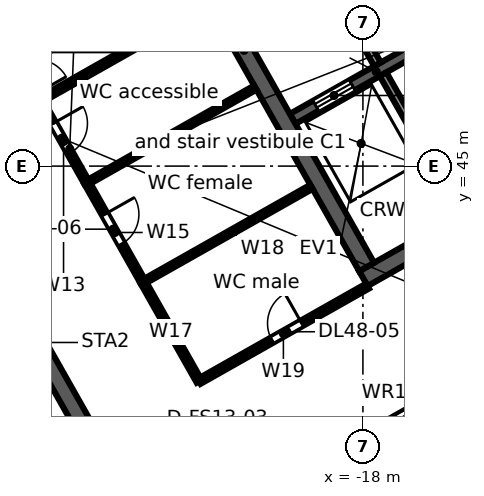
"""IFC4 building model, lengths in metres.
Left out: names, types, materials, properties, quantities, classifications, styles, units other than length and angle.
Written with IfcOpenShell. Run it as: python <this file> out.ifc"""

import sys

from ifc_helpers import new_model, si_unit, direction, frame, frame_2d, origin, place, context, subcontext, project, spatial, rectangle, extrude, element, fill, save


model = new_model("IFC4")
c1 = context("Model", 3, precision=1e-05, world=origin(), true_north=direction((0.0, 1.0)))
c2 = subcontext(c1, "Body", "Model", "MODEL_VIEW")
j1 = project(units=[si_unit("LENGTHUNIT", "METRE"), si_unit("PLANEANGLEUNIT", "RADIAN")], contexts=[c1])
p1 = place(None, origin())
s1 = spatial("IfcSite", under=j1, at=p1, CompositionType="ELEMENT")
p2 = place(p1, origin())
s2 = spatial("IfcBuilding", under=s1, at=p2, CompositionType="ELEMENT")
p3 = place(p2, frame((0.0, 0.0, 223.1)))
s3 = spatial("IfcBuildingStorey", under=s2, at=p3, CompositionType="ELEMENT", Elevation=223.1)
p4 = place(p3, frame((-0.046, 47.974, 0.0), z_axis=(0.0, 0.0, 1.0), x_axis=(-0.870356579543, -0.492421998337, 0.0)))
e1 = element("IfcWall", 1, at=p4, inside=s3, PredefinedType="STANDARD", context=c2, shape_type="SweptSolid", body=[
    extrude(rectangle(XDim=43.754, YDim=0.25, at=frame_2d((21.877, 0.0))), origin(), (0.0, 0.0, 1.0), 3.62),
])
p5 = place(p4, frame((41.061, 0.0, 0.8)))
e2 = element("IfcOpeningElement", 2, at=p5, cuts=e1, PredefinedType="OPENING", context=c2, shape_type="SweptSolid", body=[
    extrude(rectangle(XDim=2.4, YDim=2.2, at=frame_2d((1.2, 1.1))), frame((0.0, 0.135, 0.0), z_axis=(0.0, -1.0, 0.0), x_axis=(1.0, 0.0, 0.0)), (0.0, 0.0, 1.0), 0.27),
])
p6 = place(p4, frame((38.443, 0.0, 0.0)))
e3 = element("IfcOpeningElement", 3, at=p6, cuts=e1, PredefinedType="OPENING", context=c2, shape_type="SweptSolid", body=[
    extrude(rectangle(XDim=1.8, YDim=2.4, at=frame_2d((0.9, 1.2))), frame((0.0, 0.135, 0.0), z_axis=(0.0, -1.0, 0.0), x_axis=(1.0, 0.0, 0.0)), (0.0, 0.0, 1.0), 0.27),
])
p7 = place(p4, frame((35.225, 0.0, 0.8)))
e4 = element("IfcOpeningElement", 4, at=p7, cuts=e1, PredefinedType="OPENING", context=c2, shape_type="SweptSolid", body=[
    extrude(rectangle(XDim=2.4, YDim=2.2, at=frame_2d((1.2, 1.1))), frame((0.0, 0.135, 0.0), z_axis=(0.0, -1.0, 0.0), x_axis=(1.0, 0.0, 0.0)), (0.0, 0.0, 1.0), 0.27),
])
p8 = place(p4, frame((32.307, 0.0, 0.8)))
e5 = element("IfcOpeningElement", 5, at=p8, cuts=e1, PredefinedType="OPENING", context=c2, shape_type="SweptSolid", body=[
    extrude(rectangle(XDim=2.4, YDim=2.2, at=frame_2d((1.2, 1.1))), frame((0.0, 0.135, 0.0), z_axis=(0.0, -1.0, 0.0), x_axis=(1.0, 0.0, 0.0)), (0.0, 0.0, 1.0), 0.27),
])
p9 = place(p4, frame((29.688, 0.0, 0.0)))
e6 = element("IfcOpeningElement", 6, at=p9, cuts=e1, PredefinedType="OPENING", context=c2, shape_type="SweptSolid", body=[
    extrude(rectangle(XDim=1.8, YDim=2.4, at=frame_2d((0.9, 1.2))), frame((0.0, 0.135, 0.0), z_axis=(0.0, -1.0, 0.0), x_axis=(1.0, 0.0, 0.0)), (0.0, 0.0, 1.0), 0.27),
])
p10 = place(p4, frame((26.47, 0.0, 0.8)))
e7 = element("IfcOpeningElement", 7, at=p10, cuts=e1, PredefinedType="OPENING", context=c2, shape_type="SweptSolid", body=[
    extrude(rectangle(XDim=2.4, YDim=2.2, at=frame_2d((1.2, 1.1))), frame((0.0, 0.135, 0.0), z_axis=(0.0, -1.0, 0.0), x_axis=(1.0, 0.0, 0.0)), (0.0, 0.0, 1.0), 0.27),
])
p11 = place(p4, frame((23.552, 0.0, 0.8)))
e8 = element("IfcOpeningElement", 8, at=p11, cuts=e1, PredefinedType="OPENING", context=c2, shape_type="SweptSolid", body=[
    extrude(rectangle(XDim=2.4, YDim=2.2, at=frame_2d((1.2, 1.1))), frame((0.0, 0.135, 0.0), z_axis=(0.0, -1.0, 0.0), x_axis=(1.0, 0.0, 0.0)), (0.0, 0.0, 1.0), 0.27),
])
p12 = place(p4, frame((20.934, 0.0, 0.0)))
e9 = element("IfcOpeningElement", 9, at=p12, cuts=e1, PredefinedType="OPENING", context=c2, shape_type="SweptSolid", body=[
    extrude(rectangle(XDim=1.8, YDim=2.4, at=frame_2d((0.9, 1.2))), frame((0.0, 0.135, 0.0), z_axis=(0.0, -1.0, 0.0), x_axis=(1.0, 0.0, 0.0)), (0.0, 0.0, 1.0), 0.27),
])
p13 = place(p4, frame((17.716, 0.0, 0.8)))
e10 = element("IfcOpeningElement", 10, at=p13, cuts=e1, PredefinedType="OPENING", context=c2, shape_type="SweptSolid", body=[
    extrude(rectangle(XDim=2.4, YDim=2.2, at=frame_2d((1.2, 1.1))), frame((0.0, 0.135, 0.0), z_axis=(0.0, -1.0, 0.0), x_axis=(1.0, 0.0, 0.0)), (0.0, 0.0, 1.0), 0.27),
])
p14 = place(p4, frame((14.798, 0.0, 0.8)))
e11 = element("IfcOpeningElement", 11, at=p14, cuts=e1, PredefinedType="OPENING", context=c2, shape_type="SweptSolid", body=[
    extrude(rectangle(XDim=2.4, YDim=2.2, at=frame_2d((1.2, 1.1))), frame((0.0, 0.135, 0.0), z_axis=(0.0, -1.0, 0.0), x_axis=(1.0, 0.0, 0.0)), (0.0, 0.0, 1.0), 0.27),
])
p15 = place(p4, frame((12.179, 0.0, 0.0)))
e12 = element("IfcOpeningElement", 12, at=p15, cuts=e1, PredefinedType="OPENING", context=c2, shape_type="SweptSolid", body=[
    extrude(rectangle(XDim=1.8, YDim=2.4, at=frame_2d((0.9, 1.2))), frame((0.0, 0.135, 0.0), z_axis=(0.0, -1.0, 0.0), x_axis=(1.0, 0.0, 0.0)), (0.0, 0.0, 1.0), 0.27),
])
p16 = place(p4, frame((8.961, 0.0, 0.8)))
e13 = element("IfcOpeningElement", 13, at=p16, cuts=e1, PredefinedType="OPENING", context=c2, shape_type="SweptSolid", body=[
    extrude(rectangle(XDim=2.4, YDim=2.2, at=frame_2d((1.2, 1.1))), frame((0.0, 0.135, 0.0), z_axis=(0.0, -1.0, 0.0), x_axis=(1.0, 0.0, 0.0)), (0.0, 0.0, 1.0), 0.27),
])
p17 = place(p4, frame((6.043, 0.0, 0.8)))
e14 = element("IfcOpeningElement", 14, at=p17, cuts=e1, PredefinedType="OPENING", context=c2, shape_type="SweptSolid", body=[
    extrude(rectangle(XDim=2.4, YDim=2.2, at=frame_2d((1.2, 1.1))), frame((0.0, 0.135, 0.0), z_axis=(0.0, -1.0, 0.0), x_axis=(1.0, 0.0, 0.0)), (0.0, 0.0, 1.0), 0.27),
])
p18 = place(p4, frame((3.425, 0.0, 0.0)))
e15 = element("IfcOpeningElement", 15, at=p18, cuts=e1, PredefinedType="OPENING", context=c2, shape_type="SweptSolid", body=[
    extrude(rectangle(XDim=1.8, YDim=2.4, at=frame_2d((0.9, 1.2))), frame((0.0, 0.135, 0.0), z_axis=(0.0, -1.0, 0.0), x_axis=(1.0, 0.0, 0.0)), (0.0, 0.0, 1.0), 0.27),
])
p19 = place(p4, frame((0.207, 0.0, 0.8)))
e16 = element("IfcOpeningElement", 16, at=p19, cuts=e1, PredefinedType="OPENING", context=c2, shape_type="SweptSolid", body=[
    extrude(rectangle(XDim=2.4, YDim=2.2, at=frame_2d((1.2, 1.1))), frame((0.0, 0.135, 0.0), z_axis=(0.0, -1.0, 0.0), x_axis=(1.0, 0.0, 0.0)), (0.0, 0.0, 1.0), 0.27),
])
p20 = place(p3, frame((-58.732, 38.771, 0.0), z_axis=(0.0, 0.0, 1.0), x_axis=(0.870354824205, 0.492425100887, 0.0)))
e17 = element("IfcWall", 17, at=p20, inside=s3, PredefinedType="STANDARD", context=c2, shape_type="SweptSolid", body=[
    extrude(rectangle(XDim=64.006, YDim=0.25, at=frame_2d((32.003, 0.0))), origin(), (0.0, 0.0, 1.0), 3.62),
])
p21 = place(p20, frame((61.259, 0.0, 0.8)))
e18 = element("IfcOpeningElement", 18, at=p21, cuts=e17, PredefinedType="OPENING", context=c2, shape_type="SweptSolid", body=[
    extrude(rectangle(XDim=2.4, YDim=2.2, at=frame_2d((1.2, 1.1))), frame((0.0, 0.135, 0.0), z_axis=(0.0, -1.0, 0.0), x_axis=(1.0, 0.0, 0.0)), (0.0, 0.0, 1.0), 0.27),
])
p22 = place(p20, frame((58.216, 0.0, 0.8)))
e19 = element("IfcOpeningElement", 19, at=p22, cuts=e17, PredefinedType="OPENING", context=c2, shape_type="SweptSolid", body=[
    extrude(rectangle(XDim=2.4, YDim=2.2, at=frame_2d((1.2, 1.1))), frame((0.0, 0.135, 0.0), z_axis=(0.0, -1.0, 0.0), x_axis=(1.0, 0.0, 0.0)), (0.0, 0.0, 1.0), 0.27),
])
p23 = place(p20, frame((55.173, 0.0, 0.8)))
e20 = element("IfcOpeningElement", 20, at=p23, cuts=e17, PredefinedType="OPENING", context=c2, shape_type="SweptSolid", body=[
    extrude(rectangle(XDim=2.4, YDim=2.2, at=frame_2d((1.2, 1.1))), frame((0.0, 0.135, 0.0), z_axis=(0.0, -1.0, 0.0), x_axis=(1.0, 0.0, 0.0)), (0.0, 0.0, 1.0), 0.27),
])
p24 = place(p20, frame((52.129, 0.0, 0.8)))
e21 = element("IfcOpeningElement", 21, at=p24, cuts=e17, PredefinedType="OPENING", context=c2, shape_type="SweptSolid", body=[
    extrude(rectangle(XDim=2.4, YDim=2.2, at=frame_2d((1.2, 1.1))), frame((0.0, 0.135, 0.0), z_axis=(0.0, -1.0, 0.0), x_axis=(1.0, 0.0, 0.0)), (0.0, 0.0, 1.0), 0.27),
])
p25 = place(p20, frame((49.086, 0.0, 0.8)))
e22 = element("IfcOpeningElement", 22, at=p25, cuts=e17, PredefinedType="OPENING", context=c2, shape_type="SweptSolid", body=[
    extrude(rectangle(XDim=2.4, YDim=2.2, at=frame_2d((1.2, 1.1))), frame((0.0, 0.135, 0.0), z_axis=(0.0, -1.0, 0.0), x_axis=(1.0, 0.0, 0.0)), (0.0, 0.0, 1.0), 0.27),
])
p26 = place(p20, frame((46.043, 0.0, 0.8)))
e23 = element("IfcOpeningElement", 23, at=p26, cuts=e17, PredefinedType="OPENING", context=c2, shape_type="SweptSolid", body=[
    extrude(rectangle(XDim=2.4, YDim=2.2, at=frame_2d((1.2, 1.1))), frame((0.0, 0.135, 0.0), z_axis=(0.0, -1.0, 0.0), x_axis=(1.0, 0.0, 0.0)), (0.0, 0.0, 1.0), 0.27),
])
p27 = place(p20, frame((43.0, 0.0, 0.8)))
e24 = element("IfcOpeningElement", 24, at=p27, cuts=e17, PredefinedType="OPENING", context=c2, shape_type="SweptSolid", body=[
    extrude(rectangle(XDim=2.4, YDim=2.2, at=frame_2d((1.2, 1.1))), frame((0.0, 0.135, 0.0), z_axis=(0.0, -1.0, 0.0), x_axis=(1.0, 0.0, 0.0)), (0.0, 0.0, 1.0), 0.27),
])
p28 = place(p20, frame((39.956, 0.0, 0.8)))
e25 = element("IfcOpeningElement", 25, at=p28, cuts=e17, PredefinedType="OPENING", context=c2, shape_type="SweptSolid", body=[
    extrude(rectangle(XDim=2.4, YDim=2.2, at=frame_2d((1.2, 1.1))), frame((0.0, 0.135, 0.0), z_axis=(0.0, -1.0, 0.0), x_axis=(1.0, 0.0, 0.0)), (0.0, 0.0, 1.0), 0.27),
])
p29 = place(p20, frame((36.913, 0.0, 0.8)))
e26 = element("IfcOpeningElement", 26, at=p29, cuts=e17, PredefinedType="OPENING", context=c2, shape_type="SweptSolid", body=[
    extrude(rectangle(XDim=2.4, YDim=2.2, at=frame_2d((1.2, 1.1))), frame((0.0, 0.135, 0.0), z_axis=(0.0, -1.0, 0.0), x_axis=(1.0, 0.0, 0.0)), (0.0, 0.0, 1.0), 0.27),
])
p30 = place(p20, frame((33.87, 0.0, 0.8)))
e27 = element("IfcOpeningElement", 27, at=p30, cuts=e17, PredefinedType="OPENING", context=c2, shape_type="SweptSolid", body=[
    extrude(rectangle(XDim=2.4, YDim=2.2, at=frame_2d((1.2, 1.1))), frame((0.0, 0.135, 0.0), z_axis=(0.0, -1.0, 0.0), x_axis=(1.0, 0.0, 0.0)), (0.0, 0.0, 1.0), 0.27),
])
p31 = place(p20, frame((30.826, 0.0, 0.8)))
e28 = element("IfcOpeningElement", 28, at=p31, cuts=e17, PredefinedType="OPENING", context=c2, shape_type="SweptSolid", body=[
    extrude(rectangle(XDim=2.4, YDim=2.2, at=frame_2d((1.2, 1.1))), frame((0.0, 0.135, 0.0), z_axis=(0.0, -1.0, 0.0), x_axis=(1.0, 0.0, 0.0)), (0.0, 0.0, 1.0), 0.27),
])
p32 = place(p20, frame((27.783, 0.0, 0.8)))
e29 = element("IfcOpeningElement", 29, at=p32, cuts=e17, PredefinedType="OPENING", context=c2, shape_type="SweptSolid", body=[
    extrude(rectangle(XDim=2.4, YDim=2.2, at=frame_2d((1.2, 1.1))), frame((0.0, 0.135, 0.0), z_axis=(0.0, -1.0, 0.0), x_axis=(1.0, 0.0, 0.0)), (0.0, 0.0, 1.0), 0.27),
])
p33 = place(p20, frame((24.74, 0.0, 0.8)))
e30 = element("IfcOpeningElement", 30, at=p33, cuts=e17, PredefinedType="OPENING", context=c2, shape_type="SweptSolid", body=[
    extrude(rectangle(XDim=2.4, YDim=2.2, at=frame_2d((1.2, 1.1))), frame((0.0, 0.135, 0.0), z_axis=(0.0, -1.0, 0.0), x_axis=(1.0, 0.0, 0.0)), (0.0, 0.0, 1.0), 0.27),
])
p34 = place(p20, frame((21.696, 0.0, 0.8)))
e31 = element("IfcOpeningElement", 31, at=p34, cuts=e17, PredefinedType="OPENING", context=c2, shape_type="SweptSolid", body=[
    extrude(rectangle(XDim=2.4, YDim=2.2, at=frame_2d((1.2, 1.1))), frame((0.0, 0.135, 0.0), z_axis=(0.0, -1.0, 0.0), x_axis=(1.0, 0.0, 0.0)), (0.0, 0.0, 1.0), 0.27),
])
p35 = place(p20, frame((18.653, 0.0, 0.8)))
e32 = element("IfcOpeningElement", 32, at=p35, cuts=e17, PredefinedType="OPENING", context=c2, shape_type="SweptSolid", body=[
    extrude(rectangle(XDim=2.4, YDim=2.2, at=frame_2d((1.2, 1.1))), frame((0.0, 0.135, 0.0), z_axis=(0.0, -1.0, 0.0), x_axis=(1.0, 0.0, 0.0)), (0.0, 0.0, 1.0), 0.27),
])
p36 = place(p20, frame((15.61, 0.0, 0.8)))
e33 = element("IfcOpeningElement", 33, at=p36, cuts=e17, PredefinedType="OPENING", context=c2, shape_type="SweptSolid", body=[
    extrude(rectangle(XDim=2.4, YDim=2.2, at=frame_2d((1.2, 1.1))), frame((0.0, 0.135, 0.0), z_axis=(0.0, -1.0, 0.0), x_axis=(1.0, 0.0, 0.0)), (0.0, 0.0, 1.0), 0.27),
])
p37 = place(p20, frame((12.567, 0.0, 0.8)))
e34 = element("IfcOpeningElement", 34, at=p37, cuts=e17, PredefinedType="OPENING", context=c2, shape_type="SweptSolid", body=[
    extrude(rectangle(XDim=2.4, YDim=2.2, at=frame_2d((1.2, 1.1))), frame((0.0, 0.135, 0.0), z_axis=(0.0, -1.0, 0.0), x_axis=(1.0, 0.0, 0.0)), (0.0, 0.0, 1.0), 0.27),
])
p38 = place(p20, frame((9.523, 0.0, 0.8)))
e35 = element("IfcOpeningElement", 35, at=p38, cuts=e17, PredefinedType="OPENING", context=c2, shape_type="SweptSolid", body=[
    extrude(rectangle(XDim=2.4, YDim=2.2, at=frame_2d((1.2, 1.1))), frame((0.0, 0.135, 0.0), z_axis=(0.0, -1.0, 0.0), x_axis=(1.0, 0.0, 0.0)), (0.0, 0.0, 1.0), 0.27),
])
p39 = place(p20, frame((6.48, 0.0, 0.8)))
e36 = element("IfcOpeningElement", 36, at=p39, cuts=e17, PredefinedType="OPENING", context=c2, shape_type="SweptSolid", body=[
    extrude(rectangle(XDim=2.4, YDim=2.2, at=frame_2d((1.2, 1.1))), frame((0.0, 0.135, 0.0), z_axis=(0.0, -1.0, 0.0), x_axis=(1.0, 0.0, 0.0)), (0.0, 0.0, 1.0), 0.27),
])
p40 = place(p20, frame((3.437, 0.0, 0.8)))
e37 = element("IfcOpeningElement", 37, at=p40, cuts=e17, PredefinedType="OPENING", context=c2, shape_type="SweptSolid", body=[
    extrude(rectangle(XDim=2.4, YDim=2.2, at=frame_2d((1.2, 1.1))), frame((0.0, 0.135, 0.0), z_axis=(0.0, -1.0, 0.0), x_axis=(1.0, 0.0, 0.0)), (0.0, 0.0, 1.0), 0.27),
])
p41 = place(p20, frame((0.393, 0.0, 0.8)))
e38 = element("IfcOpeningElement", 38, at=p41, cuts=e17, PredefinedType="OPENING", context=c2, shape_type="SweptSolid", body=[
    extrude(rectangle(XDim=2.4, YDim=2.2, at=frame_2d((1.2, 1.1))), frame((0.0, 0.135, 0.0), z_axis=(0.0, -1.0, 0.0), x_axis=(1.0, 0.0, 0.0)), (0.0, 0.0, 1.0), 0.27),
])
p42 = place(p3, frame((-31.787, 49.542, 0.0), z_axis=(0.0, 0.0, 1.0), x_axis=(0.492421378713, -0.870356930107, 0.0)))
e39 = element("IfcWall", 39, at=p42, inside=s3, PredefinedType="SOLIDWALL", context=c2, shape_type="SweptSolid", body=[
    extrude(rectangle(XDim=13.1, YDim=0.45, at=frame_2d((6.55, 0.0))), origin(), (0.0, 0.0, 1.0), 3.62),
])
p43 = place(p3, frame((-17.988, 42.039, 0.0), z_axis=(0.0, 0.0, 1.0), x_axis=(0.870360574057, 0.492414937962, 0.0)))
e40 = element("IfcWall", 40, at=p43, inside=s3, PredefinedType="SOLIDWALL", context=c2, shape_type="SweptSolid", body=[
    extrude(rectangle(XDim=15.0, YDim=0.45, at=frame_2d((7.5, 0.0))), origin(), (0.0, 0.0, 1.0), 3.62),
])
p44 = place(p43, frame((6.1, 0.0, 0.0)))
e41 = element("IfcOpeningElement", 41, at=p44, cuts=e40, PredefinedType="OPENING", context=c2, shape_type="SweptSolid", body=[
    extrude(rectangle(XDim=1.2, YDim=2.1, at=frame_2d((0.6, 1.05))), frame((0.0, 0.235, 0.0), z_axis=(0.0, -1.0, 0.0), x_axis=(1.0, 0.0, 0.0)), (0.0, 0.0, 1.0), 0.47),
])
p45 = place(p3, frame((-19.849, 46.242, 0.0), z_axis=(0.0, 0.0, 1.0), x_axis=(0.870347559728, 0.492437940532, 0.0)))
e42 = element("IfcWall", 42, at=p45, inside=s3, PredefinedType="SOLIDWALL", context=c2, shape_type="SweptSolid", body=[
    extrude(rectangle(XDim=5.05, YDim=0.3, at=frame_2d((2.525, 0.0))), origin(), (0.0, 0.0, 1.0), 3.62),
])
p46 = place(p45, frame((0.7, 0.0, 0.0)))
e43 = element("IfcOpeningElement", 43, at=p46, cuts=e42, PredefinedType="OPENING", context=c2, shape_type="SweptSolid", body=[
    extrude(rectangle(XDim=1.1, YDim=2.1, at=frame_2d((0.55, 1.05))), frame((0.0, 0.16, 0.0), z_axis=(0.0, -1.0, 0.0), x_axis=(1.0, 0.0, 0.0)), (0.0, 0.0, 1.0), 0.32),
])
p47 = place(p45, frame((3.8, 0.0, 0.0)))
e44 = element("IfcOpeningElement", 44, at=p47, cuts=e42, PredefinedType="OPENING", context=c2, shape_type="SweptSolid", body=[
    extrude(rectangle(XDim=0.9, YDim=2.1, at=frame_2d((0.45, 1.05))), frame((0.0, 0.16, 0.0), z_axis=(0.0, -1.0, 0.0), x_axis=(1.0, 0.0, 0.0)), (0.0, 0.0, 1.0), 0.32),
])
p48 = place(p3, frame((-24.353, 53.747, 0.0), z_axis=(0.0, 0.0, 1.0), x_axis=(0.492435496286, -0.870348942665, 0.0)))
e45 = element("IfcWall", 45, at=p48, inside=s3, PredefinedType="SOLIDWALL", context=c2, shape_type="SweptSolid", body=[
    extrude(rectangle(XDim=13.1, YDim=0.45, at=frame_2d((6.55, 0.0))), origin(), (0.0, 0.0, 1.0), 3.62),
])
p49 = place(p3, frame((-17.469, 47.417, 0.0), z_axis=(0.0, 0.0, 1.0), x_axis=(0.492453686477, -0.870338650569, 0.0)))
e46 = element("IfcWall", 46, at=p49, inside=s3, PredefinedType="SOLIDWALL", context=c2, shape_type="SweptSolid", body=[
    extrude(rectangle(XDim=4.2, YDim=0.2, at=frame_2d((2.1, 0.0))), origin(), (0.0, 0.0, 1.0), 3.62),
])
p50 = place(p3, frame((-19.635, 51.246, 0.0), z_axis=(0.0, 0.0, 1.0), x_axis=(0.492408451753, -0.87036424366, 0.0)))
e47 = element("IfcWall", 47, at=p50, inside=s3, PredefinedType="PARTITIONING", context=c2, shape_type="SweptSolid", body=[
    extrude(rectangle(XDim=4.1, YDim=0.2, at=frame_2d((2.05, 0.0))), origin(), (0.0, 0.0, 1.0), 3.62),
])
p51 = place(p50, frame((1.55, 0.0, 0.0)))
e48 = element("IfcOpeningElement", 48, at=p51, cuts=e47, PredefinedType="OPENING", context=c2, shape_type="SweptSolid", body=[
    extrude(rectangle(XDim=1.0, YDim=2.1, at=frame_2d((0.5, 1.05))), frame((0.0, 0.11, 0.0), z_axis=(0.0, -1.0, 0.0), x_axis=(1.0, 0.0, 0.0)), (0.0, 0.0, 1.0), 0.22),
])
p52 = place(p3, frame((-27.232, 48.04, 0.0), z_axis=(0.0, 0.0, 1.0), x_axis=(0.870339461844, 0.492452252668, 0.0)))
e49 = element("IfcWall", 49, at=p52, inside=s3, PredefinedType="PARTITIONING", context=c2, shape_type="SweptSolid", body=[
    extrude(rectangle(XDim=5.091, YDim=0.125, at=frame_2d((2.545, 0.0))), origin(), (0.0, 0.0, 1.0), 2.892),
])
p53 = place(p3, frame((-26.493, 46.734, 0.0), z_axis=(0.0, 0.0, 1.0), x_axis=(0.49257867544, -0.870267917656, 0.0)))
e50 = element("IfcWall", 50, at=p53, inside=s3, PredefinedType="PARTITIONING", context=c2, shape_type="SweptSolid", body=[
    extrude(rectangle(XDim=2.499, YDim=0.15, at=frame_2d((1.25, 0.0))), origin(), (0.0, 0.0, 1.0), 2.892),
])
p54 = place(p53, frame((0.7, 0.0, 0.0)))
e51 = element("IfcOpeningElement", 51, at=p54, cuts=e50, PredefinedType="OPENING", context=c2, shape_type="SweptSolid", body=[
    extrude(rectangle(XDim=0.9, YDim=2.1, at=frame_2d((0.45, 1.05))), frame((0.0, 0.085, 0.0), z_axis=(0.0, -1.0, 0.0), x_axis=(1.0, 0.0, 0.0)), (0.0, 0.0, 1.0), 0.17),
])
p55 = place(p3, frame((-26.493, 46.734, 0.0), z_axis=(0.0, 0.0, 1.0), x_axis=(0.870339461844, 0.492452252668, 0.0)))
e52 = element("IfcWall", 52, at=p55, inside=s3, PredefinedType="PARTITIONING", context=c2, shape_type="SweptSolid", body=[
    extrude(rectangle(XDim=5.091, YDim=0.15, at=frame_2d((2.545, 0.0))), origin(), (0.0, 0.0, 1.0), 2.892),
])
p56 = place(p3, frame((-25.262, 44.559, 0.0), z_axis=(0.0, 0.0, 1.0), x_axis=(0.492226144536, -0.870467358742, 0.0)))
e53 = element("IfcWall", 53, at=p56, inside=s3, PredefinedType="PARTITIONING", context=c2, shape_type="SweptSolid", body=[
    extrude(rectangle(XDim=3.001, YDim=0.15, at=frame_2d((1.5, 0.0))), origin(), (0.0, 0.0, 1.0), 3.62),
])
p57 = place(p56, frame((0.95, 0.0, 0.0)))
e54 = element("IfcOpeningElement", 54, at=p57, cuts=e53, PredefinedType="OPENING", context=c2, shape_type="SweptSolid", body=[
    extrude(rectangle(XDim=0.9, YDim=2.1, at=frame_2d((0.45, 1.05))), frame((0.0, 0.085, 0.0), z_axis=(0.0, -1.0, 0.0), x_axis=(1.0, 0.0, 0.0)), (0.0, 0.0, 1.0), 0.17),
])
p58 = place(p3, frame((-25.262, 44.559, 0.0), z_axis=(0.0, 0.0, 1.0), x_axis=(0.870442223229, 0.492270592276, 0.0)))
e55 = element("IfcWall", 55, at=p58, inside=s3, PredefinedType="PARTITIONING", context=c2, shape_type="SweptSolid", body=[
    extrude(rectangle(XDim=5.09, YDim=0.125, at=frame_2d((2.545, 0.0))), origin(), (0.0, 0.0, 1.0), 3.62),
])
p59 = place(p3, frame((-23.785, 41.947, 0.0), z_axis=(0.0, 0.0, 1.0), x_axis=(0.492303960105, -0.870423351516, 0.0)))
e56 = element("IfcWall", 56, at=p59, inside=s3, PredefinedType="PARTITIONING", context=c2, shape_type="SweptSolid", body=[
    extrude(rectangle(XDim=3.0, YDim=0.15, at=frame_2d((1.5, 0.0))), origin(), (0.0, 0.0, 1.0), 3.62),
])
p60 = place(p3, frame((-23.785, 41.947, 0.0), z_axis=(0.0, 0.0, 1.0), x_axis=(0.870339461844, 0.492452252668, 0.0)))
e57 = element("IfcWall", 57, at=p60, inside=s3, PredefinedType="PARTITIONING", context=c2, shape_type="SweptSolid", body=[
    extrude(rectangle(XDim=5.091, YDim=0.125, at=frame_2d((2.545, 0.0))), origin(), (0.0, 0.0, 1.0), 3.62),
])
p61 = place(p3, frame((-22.308, 39.336, 0.0), z_axis=(0.0, 0.0, 1.0), x_axis=(0.870351090701, 0.492431699747, 0.0)))
e58 = element("IfcWall", 58, at=p61, inside=s3, PredefinedType="PARTITIONING", context=c2, shape_type="SweptSolid", body=[
    extrude(rectangle(XDim=5.091, YDim=0.15, at=frame_2d((2.546, 0.0))), origin(), (0.0, 0.0, 1.0), 3.62),
])
p62 = place(p61, frame((2.2, 0.0, 0.0)))
e59 = element("IfcOpeningElement", 59, at=p62, cuts=e58, PredefinedType="OPENING", context=c2, shape_type="SweptSolid", body=[
    extrude(rectangle(XDim=0.9, YDim=2.1, at=frame_2d((0.45, 1.05))), frame((0.0, 0.085, 0.0), z_axis=(0.0, -1.0, 0.0), x_axis=(1.0, 0.0, 0.0)), (0.0, 0.0, 1.0), 0.17),
])
p63 = place(p13, origin())
e60 = element("IfcWindow", 60, at=p63, inside=s3, PartitioningType="SINGLE_PANEL", PredefinedType="WINDOW", context=c2, shape_type="SweptSolid", body=[
    extrude(rectangle(XDim=2.4, YDim=2.2, at=frame_2d((1.2, 1.1))), frame((0.0, 0.03, 0.0), z_axis=(0.0, -1.0, 0.0), x_axis=(1.0, 0.0, 0.0)), (0.0, 0.0, 1.0), 0.06),
])
fill(e10, e60)
p64 = place(p46, origin())
e61 = element("IfcDoor", 61, at=p64, inside=s3, OperationType="DOUBLE_DOOR_SLIDING", PredefinedType="DOOR", context=c2, shape_type="SweptSolid", body=[
    extrude(rectangle(XDim=1.1, YDim=2.1, at=frame_2d((0.55, 1.05))), frame((0.0, 0.025, 0.0), z_axis=(0.0, -1.0, 0.0), x_axis=(1.0, 0.0, 0.0)), (0.0, 0.0, 1.0), 0.05),
])
fill(e43, e61)
p65 = place(p62, origin())
e62 = element("IfcDoor", 62, at=p65, inside=s3, OperationType="SINGLE_SWING_RIGHT", PredefinedType="DOOR", context=c2, shape_type="SweptSolid", body=[
    extrude(rectangle(XDim=0.9, YDim=2.1, at=frame_2d((0.45, 1.05))), frame((0.0, 0.025, 0.0), z_axis=(0.0, -1.0, 0.0), x_axis=(1.0, 0.0, 0.0)), (0.0, 0.0, 1.0), 0.05),
])
fill(e59, e62)
p66 = place(p57, origin())
e63 = element("IfcDoor", 63, at=p66, inside=s3, OperationType="SINGLE_SWING_LEFT", PredefinedType="DOOR", context=c2, shape_type="SweptSolid", body=[
    extrude(rectangle(XDim=0.9, YDim=2.1, at=frame_2d((0.45, 1.05))), frame((0.0, 0.025, 0.0), z_axis=(0.0, -1.0, 0.0), x_axis=(1.0, 0.0, 0.0)), (0.0, 0.0, 1.0), 0.05),
])
fill(e54, e63)
p67 = place(p54, origin())
e64 = element("IfcDoor", 64, at=p67, inside=s3, OperationType="SINGLE_SWING_LEFT", PredefinedType="DOOR", context=c2, shape_type="SweptSolid", body=[
    extrude(rectangle(XDim=0.9, YDim=2.1, at=frame_2d((0.45, 1.05))), frame((0.0, 0.025, 0.0), z_axis=(0.0, -1.0, 0.0), x_axis=(1.0, 0.0, 0.0)), (0.0, 0.0, 1.0), 0.05),
])
fill(e51, e64)
save(model, sys.argv[1])
